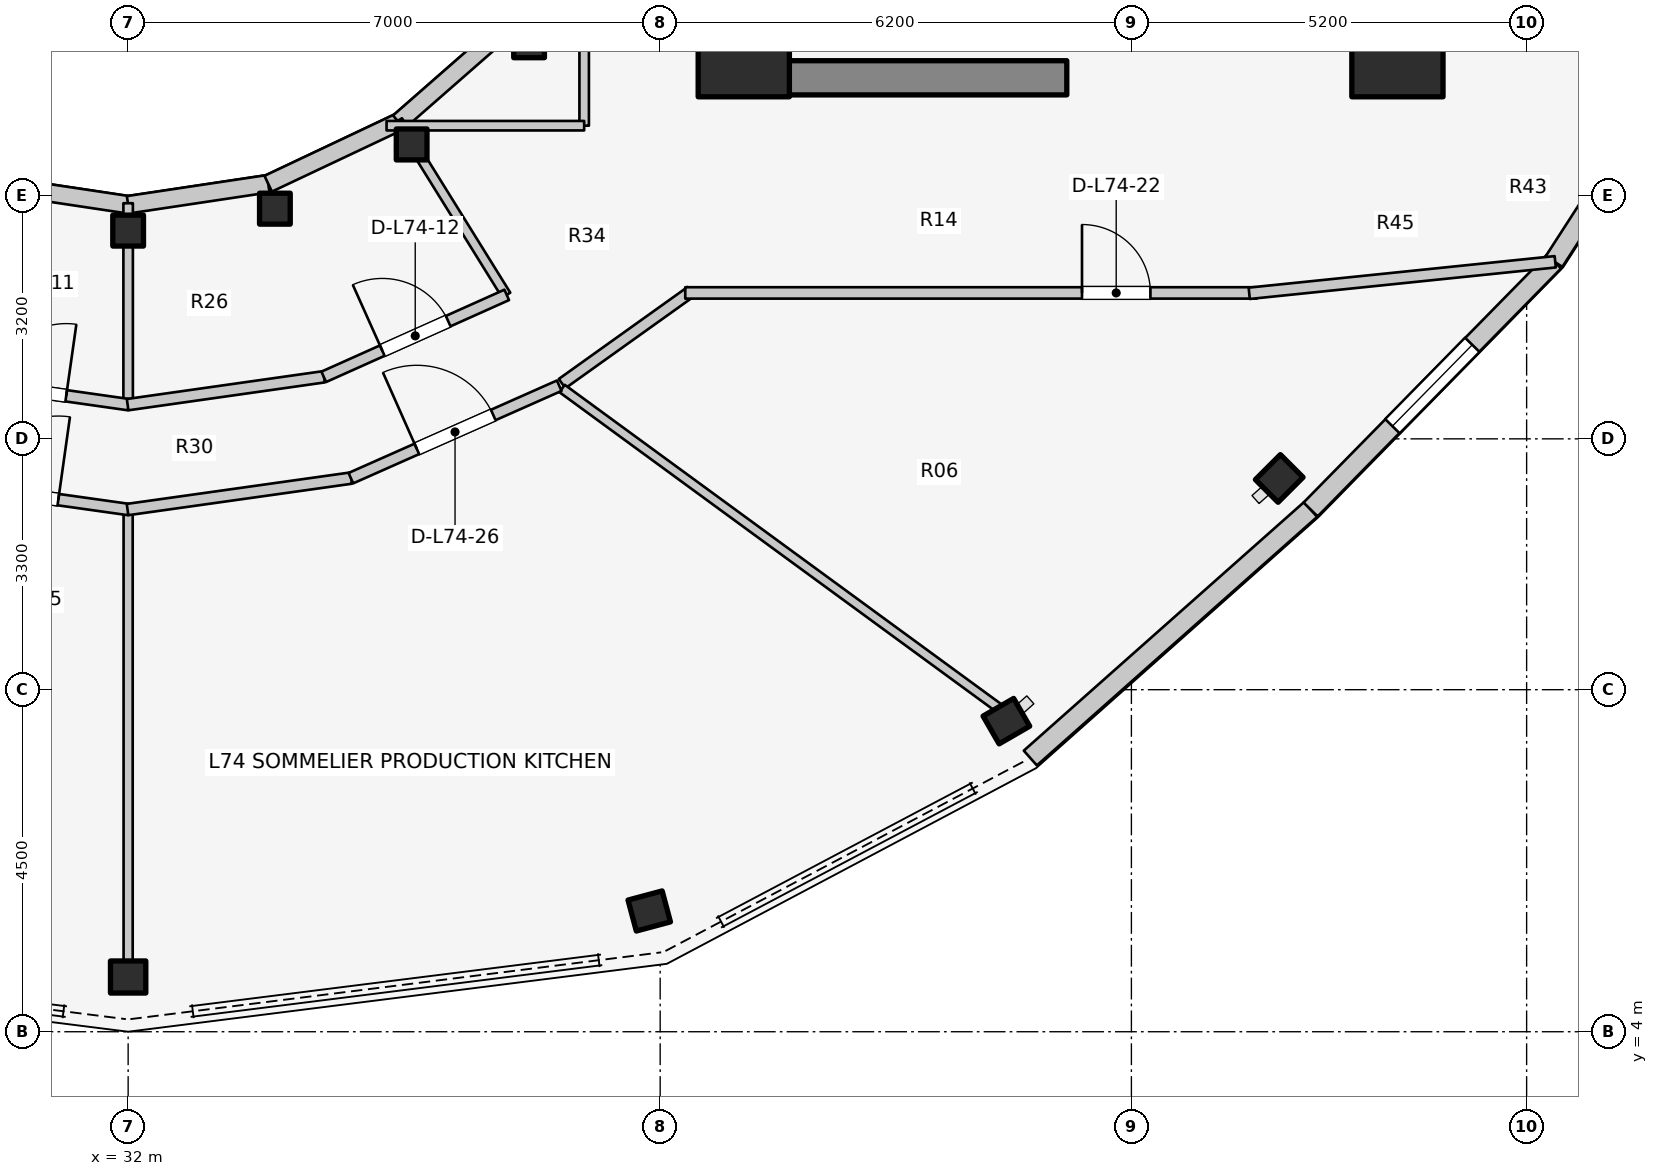
"""IFC4 building model, lengths in metres.
Left out: names, types, materials, properties, quantities, classifications, styles, units other than length and angle.
Written with IfcOpenShell. Run it as: python <this file> out.ifc"""

import sys

from ifc_helpers import new_model, si_unit, direction, frame, frame_2d, origin, origin_2d, place, context, subcontext, project, spatial, rectangle, i_section, extrude, element, fill, save


model = new_model("IFC4")
c1 = context("Model", 3, precision=1e-05, world=origin(), true_north=direction((0.0, 1.0)))
c2 = subcontext(c1, "Body", "Model", "MODEL_VIEW")
j1 = project(units=[si_unit("LENGTHUNIT", "METRE"), si_unit("PLANEANGLEUNIT", "RADIAN")], contexts=[c1])
p1 = place(None, origin())
s1 = spatial("IfcSite", under=j1, at=p1, CompositionType="ELEMENT")
p2 = place(p1, origin())
s2 = spatial("IfcBuilding", under=s1, at=p2, CompositionType="ELEMENT")
p3 = place(p2, frame((0.0, 0.0, 242.4)))
s3 = spatial("IfcBuildingStorey", under=s2, at=p3, CompositionType="ELEMENT", Elevation=242.4)
p4 = place(p3, frame((39.85, 16.55, 0.0), z_axis=(0.0, 0.0, 1.0), x_axis=(1.0, 0.0, 0.0)))
e1 = element("IfcWall", 1, at=p4, inside=s3, PredefinedType="SHEAR", context=c2, shape_type="SweptSolid", body=[
    extrude(rectangle(XDim=4.5, YDim=0.45, at=frame_2d((2.25, 0.0))), origin(), (0.0, 0.0, 1.0), 3.6),
])
for number, where, z_axis, x_axis in (
    (2, (40.1, 16.9, 0.0), (0.0, 0.0, 1.0), (1.0, 0.0, 0.0)),
    (3, (48.7, 16.9, 0.0), (0.0, 0.0, 1.0), (1.0, 0.0, 0.0)),
):
    element("IfcColumn", number, at=place(p3, frame(where, z_axis=z_axis, x_axis=x_axis)), inside=s3, PredefinedType="COLUMN", context=c2, shape_type="SweptSolid", body=[
        extrude(rectangle(XDim=1.2, YDim=1.2, at=origin_2d()), origin(), (0.0, 0.0, 1.0), 3.6),
    ])
p5 = place(p3, frame((32.0, 14.54, 0.0), z_axis=(0.0, 0.0, 1.0), x_axis=(1.0, 0.0, 0.0)))
e4 = element("IfcColumn", 4, at=p5, inside=s3, PredefinedType="COLUMN", context=c2, shape_type="SweptSolid", body=[
    extrude(i_section(OverallWidth=0.404, OverallDepth=0.407, WebThickness=0.027, FlangeThickness=0.044, FilletRadius=0.025, at=origin_2d()), origin(), (0.0, 0.0, 1.0), 3.6),
])
p6 = place(p3, frame((32.0, 4.72, 0.0), z_axis=(0.0, 0.0, 1.0), x_axis=(0.0, -1.0, 0.0)))
e5 = element("IfcColumn", 5, at=p6, inside=s3, PredefinedType="COLUMN", context=c2, shape_type="SweptSolid", body=[
    extrude(i_section(OverallWidth=0.422, OverallDepth=0.465, WebThickness=0.045, FlangeThickness=0.073, FilletRadius=0.025, at=origin_2d()), origin(), (0.0, 0.0, 1.0), 3.6),
])
p7 = place(p3, frame((33.931, 14.828, 0.0), z_axis=(0.0, 0.0, 1.0), x_axis=(1.0, 0.0, 0.0)))
e6 = element("IfcColumn", 6, at=p7, inside=s3, PredefinedType="COLUMN", context=c2, shape_type="SweptSolid", body=[
    extrude(i_section(OverallWidth=0.404, OverallDepth=0.407, WebThickness=0.027, FlangeThickness=0.044, FilletRadius=0.025, at=origin_2d()), origin(), (0.0, 0.0, 1.0), 3.6),
])
p8 = place(p3, frame((38.856, 5.589, 0.0), z_axis=(0.0, 0.0, 1.0), x_axis=(0.258819045103, -0.965925826289, 0.0)))
e7 = element("IfcColumn", 7, at=p8, inside=s3, PredefinedType="COLUMN", context=c2, shape_type="SweptSolid", body=[
    extrude(i_section(OverallWidth=0.422, OverallDepth=0.465, WebThickness=0.045, FlangeThickness=0.073, FilletRadius=0.025, at=origin_2d()), origin(), (0.0, 0.0, 1.0), 3.6),
])
p9 = place(p3, frame((35.73, 15.673, 0.0), z_axis=(0.0, 0.0, 1.0), x_axis=(1.0, 0.0, 0.0)))
e8 = element("IfcColumn", 8, at=p9, inside=s3, PredefinedType="COLUMN", context=c2, shape_type="SweptSolid", body=[
    extrude(i_section(OverallWidth=0.404, OverallDepth=0.407, WebThickness=0.027, FlangeThickness=0.044, FilletRadius=0.025, at=origin_2d()), origin(), (0.0, 0.0, 1.0), 3.6),
])
p10 = place(p3, frame((43.555, 8.086, 0.0), z_axis=(0.0, 0.0, 1.0), x_axis=(0.5, -0.866025403784, 0.0)))
e9 = element("IfcColumn", 9, at=p10, inside=s3, PredefinedType="COLUMN", context=c2, shape_type="SweptSolid", body=[
    extrude(i_section(OverallWidth=0.422, OverallDepth=0.465, WebThickness=0.045, FlangeThickness=0.073, FilletRadius=0.025, at=origin_2d()), origin(), (0.0, 0.0, 1.0), 3.6),
])
p11 = place(p3, frame((37.275, 17.018, 0.0), z_axis=(0.0, 0.0, 1.0), x_axis=(1.0, 0.0, 0.0)))
e10 = element("IfcColumn", 10, at=p11, inside=s3, PredefinedType="COLUMN", context=c2, shape_type="SweptSolid", body=[
    extrude(i_section(OverallWidth=0.404, OverallDepth=0.407, WebThickness=0.027, FlangeThickness=0.044, FilletRadius=0.025, at=origin_2d()), origin(), (0.0, 0.0, 1.0), 3.6),
])
p12 = place(p3, frame((47.145, 11.279, 0.0), z_axis=(0.0, 0.0, 1.0), x_axis=(0.707106781187, -0.707106781187, 0.0)))
e11 = element("IfcColumn", 11, at=p12, inside=s3, PredefinedType="COLUMN", context=c2, shape_type="SweptSolid", body=[
    extrude(i_section(OverallWidth=0.422, OverallDepth=0.465, WebThickness=0.045, FlangeThickness=0.073, FilletRadius=0.025, at=origin_2d()), origin(), (0.0, 0.0, 1.0), 3.6),
])
for number, where, z_axis, x_axis in (
    (12, (30.157, 15.157, 0.0), (0.0, 0.0, 1.0), (0.989, -0.149, 0.0)),
    (13, (32.0, 14.88, 0.0), (0.0, 0.0, 1.0), (0.989, 0.149, 0.0)),
):
    element("IfcWall", number, at=place(p3, frame(where, z_axis=z_axis, x_axis=x_axis)), inside=s3, PredefinedType="STANDARD", context=c2, shape_type="SweptSolid", body=[
        extrude(rectangle(XDim=1.864, YDim=0.23, at=frame_2d((0.932, 0.0))), origin(), (0.0, 0.0, 1.0), 2.6),
    ])
p13 = place(p3, frame((33.843, 15.157, 0.0), z_axis=(0.0, 0.0, 1.0), x_axis=(0.904179699603, 0.427152280606, 0.0)))
e14 = element("IfcWall", 14, at=p13, inside=s3, PredefinedType="STANDARD", context=c2, shape_type="SweptSolid", body=[
    extrude(rectangle(XDim=1.899, YDim=0.23, at=frame_2d((0.95, 0.0))), origin(), (0.0, 0.0, 1.0), 2.6),
])
p14 = place(p3, frame((35.56, 15.968, 0.0), z_axis=(0.0, 0.0, 1.0), x_axis=(0.752576694707, 0.658504607869, 0.0)))
e15 = element("IfcWall", 15, at=p14, inside=s3, PredefinedType="STANDARD", context=c2, shape_type="SweptSolid", body=[
    extrude(rectangle(XDim=1.959, YDim=0.23, at=frame_2d((0.98, 0.0))), origin(), (0.0, 0.0, 1.0), 2.6),
])
p15 = place(p3, frame((43.87, 7.601, 0.0), z_axis=(0.0, 0.0, 1.0), x_axis=(0.748165854006, 0.663511759428, 0.0)))
e16 = element("IfcWall", 16, at=p15, inside=s3, PredefinedType="STANDARD", context=c2, shape_type="SweptSolid", body=[
    extrude(rectangle(XDim=4.929, YDim=0.26, at=frame_2d((2.464, 0.0))), origin(), (0.0, 0.0, 1.0), 3.29),
])
p16 = place(p3, frame((47.558, 10.871, 0.0), z_axis=(0.0, 0.0, 1.0), x_axis=(0.700642973333, 0.713512034881, 0.0)))
e17 = element("IfcWall", 17, at=p16, inside=s3, PredefinedType="STANDARD", context=c2, shape_type="SweptSolid", body=[
    extrude(rectangle(XDim=4.572, YDim=0.26, at=frame_2d((2.286, 0.0))), origin(), (0.0, 0.0, 1.0), 3.29),
])
p17 = place(p16, frame((1.536, 0.0, 0.75)))
e18 = element("IfcOpeningElement", 18, at=p17, cuts=e17, PredefinedType="OPENING", context=c2, shape_type="SweptSolid", body=[
    extrude(rectangle(XDim=1.5, YDim=1.6, at=frame_2d((0.75, 0.8))), frame((0.0, 0.14, 0.0), z_axis=(0.0, -1.0, 0.0), x_axis=(1.0, 0.0, 0.0)), (0.0, 0.0, 1.0), 0.28),
])
p18 = place(p3, frame((50.761, 14.133, 0.0), z_axis=(0.0, 0.0, 1.0), x_axis=(0.542641766008, 0.839964233634, 0.0)))
e19 = element("IfcWall", 19, at=p18, inside=s3, PredefinedType="STANDARD", context=c2, shape_type="SweptSolid", body=[
    extrude(rectangle(XDim=4.319, YDim=0.26, at=frame_2d((2.16, 0.0))), origin(), (0.0, 0.0, 1.0), 3.29),
])
p19 = place(p18, frame((1.41, 0.0, 0.75)))
e20 = element("IfcOpeningElement", 20, at=p19, cuts=e19, PredefinedType="OPENING", context=c2, shape_type="SweptSolid", body=[
    extrude(rectangle(XDim=1.5, YDim=1.6, at=frame_2d((0.75, 0.8))), frame((0.0, 0.14, 0.0), z_axis=(0.0, -1.0, 0.0), x_axis=(1.0, 0.0, 0.0)), (0.0, 0.0, 1.0), 0.28),
])
p20 = place(p3, frame((32.0, 14.9, 0.0), z_axis=(0.0, 0.0, 1.0), x_axis=(0.0, -1.0, 0.0)))
e21 = element("IfcWall", 21, at=p20, inside=s3, PredefinedType="PARTITIONING", context=c2, shape_type="SweptSolid", body=[
    extrude(rectangle(XDim=2.65, YDim=0.125, at=frame_2d((1.325, 0.0))), origin(), (0.0, 0.0, 1.0), 2.672),
])
p21 = place(p3, frame((35.55, 15.985, 0.0), z_axis=(0.0, 0.0, 1.0), x_axis=(0.527527080983, -0.849538215049, 0.0)))
e22 = element("IfcWall", 22, at=p21, inside=s3, PredefinedType="PARTITIONING", context=c2, shape_type="SweptSolid", body=[
    extrude(rectangle(XDim=2.701, YDim=0.125, at=frame_2d((1.351, 0.0))), origin(), (0.0, 0.0, 1.0), 2.672),
])
p22 = place(p3, frame((29.423, 12.617, 0.0), z_axis=(0.0, 0.0, 1.0), x_axis=(0.990078185178, -0.140517569133, 0.0)))
e23 = element("IfcWall", 23, at=p22, inside=s3, PredefinedType="PARTITIONING", context=c2, shape_type="SweptSolid", body=[
    extrude(rectangle(XDim=2.61, YDim=0.15, at=frame_2d((1.305, 0.0))), origin(), (0.0, 0.0, 1.0), 2.816),
])
p23 = place(p22, frame((0.83, 0.0, 0.0)))
e24 = element("IfcOpeningElement", 24, at=p23, cuts=e23, PredefinedType="OPENING", context=c2, shape_type="SweptSolid", body=[
    extrude(rectangle(XDim=0.95, YDim=2.1, at=frame_2d((0.475, 1.05))), frame((0.0, 0.085, 0.0), z_axis=(0.0, -1.0, 0.0), x_axis=(1.0, 0.0, 0.0)), (0.0, 0.0, 1.0), 0.17),
])
p24 = place(p3, frame((31.993, 12.25, 0.0), z_axis=(0.0, 0.0, 1.0), x_axis=(0.990078185178, 0.140517569133, 0.0)))
e25 = element("IfcWall", 25, at=p24, inside=s3, PredefinedType="PARTITIONING", context=c2, shape_type="SweptSolid", body=[
    extrude(rectangle(XDim=2.61, YDim=0.15, at=frame_2d((1.305, 0.0))), origin(), (0.0, 0.0, 1.0), 2.816),
])
p25 = place(p3, frame((34.573, 12.616, 0.0), z_axis=(0.0, 0.0, 1.0), x_axis=(0.912628408652, 0.408790151203, 0.0)))
e26 = element("IfcWall", 26, at=p25, inside=s3, PredefinedType="PARTITIONING", context=c2, shape_type="SweptSolid", body=[
    extrude(rectangle(XDim=2.638, YDim=0.15, at=frame_2d((1.319, 0.0))), origin(), (0.0, 0.0, 1.0), 2.816),
])
p26 = place(p25, frame((0.844, 0.0, 0.0)))
e27 = element("IfcOpeningElement", 27, at=p26, cuts=e26, PredefinedType="OPENING", context=c2, shape_type="SweptSolid", body=[
    extrude(rectangle(XDim=0.95, YDim=2.1, at=frame_2d((0.475, 1.05))), frame((0.0, 0.085, 0.0), z_axis=(0.0, -1.0, 0.0), x_axis=(1.0, 0.0, 0.0)), (0.0, 0.0, 1.0), 0.17),
])
p27 = place(p3, frame((38.0, 15.92, 0.0), z_axis=(0.0, 0.0, 1.0), x_axis=(0.0, 1.0, 0.0)))
e28 = element("IfcWall", 28, at=p27, inside=s3, PredefinedType="PARTITIONING", context=c2, shape_type="SweptSolid", body=[
    extrude(rectangle(XDim=4.28, YDim=0.125, at=frame_2d((2.14, 0.0))), origin(), (0.0, 0.0, 1.0), 2.672),
])
p28 = place(p3, frame((35.4, 15.92, 0.0), z_axis=(0.0, 0.0, 1.0), x_axis=(1.0, 0.0, 0.0)))
e29 = element("IfcWall", 29, at=p28, inside=s3, PredefinedType="PARTITIONING", context=c2, shape_type="SweptSolid", body=[
    extrude(rectangle(XDim=2.6, YDim=0.125, at=frame_2d((1.3, 0.0))), origin(), (0.0, 0.0, 1.0), 2.672),
])
p29 = place(p3, frame((37.71, 12.527, 0.0), z_axis=(0.0, 0.0, 1.0), x_axis=(0.813780999276, 0.581171648669, 0.0)))
e30 = element("IfcWall", 30, at=p29, inside=s3, PredefinedType="PARTITIONING", context=c2, shape_type="SweptSolid", body=[
    extrude(rectangle(XDim=2.082, YDim=0.15, at=frame_2d((1.041, 0.0))), origin(), (0.0, 0.0, 1.0), 2.816),
])
p30 = place(p3, frame((39.33, 13.72, 0.0), z_axis=(0.0, 0.0, 1.0), x_axis=(1.0, 0.0, 0.0)))
e31 = element("IfcWall", 31, at=p30, inside=s3, PredefinedType="PARTITIONING", context=c2, shape_type="SweptSolid", body=[
    extrude(rectangle(XDim=7.52, YDim=0.15, at=frame_2d((3.76, 0.0))), origin(), (0.0, 0.0, 1.0), 2.816),
])
p31 = place(p30, frame((5.22, 0.0, 0.0)))
e32 = element("IfcOpeningElement", 32, at=p31, cuts=e31, PredefinedType="OPENING", context=c2, shape_type="SweptSolid", body=[
    extrude(rectangle(XDim=0.9, YDim=2.1, at=frame_2d((0.45, 1.05))), frame((0.0, 0.085, 0.0), z_axis=(0.0, -1.0, 0.0), x_axis=(1.0, 0.0, 0.0)), (0.0, 0.0, 1.0), 0.17),
])
p32 = place(p3, frame((46.75, 13.715, 0.0), z_axis=(0.0, 0.0, 1.0), x_axis=(0.994734711466, 0.102483431859, 0.0)))
e33 = element("IfcWall", 33, at=p32, inside=s3, PredefinedType="PARTITIONING", context=c2, shape_type="SweptSolid", body=[
    extrude(rectangle(XDim=4.047, YDim=0.15, at=frame_2d((2.024, 0.0))), origin(), (0.0, 0.0, 1.0), 2.66),
])
p33 = place(p3, frame((32.0, 10.815, 0.0), z_axis=(0.0, 0.0, 1.0), x_axis=(0.0, -1.0, 0.0)))
e34 = element("IfcWall", 34, at=p33, inside=s3, PredefinedType="MOVABLE", context=c2, shape_type="SweptSolid", body=[
    extrude(rectangle(XDim=5.895, YDim=0.12, at=frame_2d((2.948, 0.0))), origin(), (0.0, 0.0, 1.0), 2.66),
])
p34 = place(p3, frame((37.709, 12.463, 0.0), z_axis=(0.0, 0.0, 1.0), x_axis=(0.807095694912, -0.590420646027, 0.0)))
e35 = element("IfcWall", 35, at=p34, inside=s3, PredefinedType="MOVABLE", context=c2, shape_type="SweptSolid", body=[
    extrude(rectangle(XDim=7.119, YDim=0.12, at=frame_2d((3.56, 0.0))), origin(), (0.0, 0.0, 1.0), 2.66),
])
p35 = place(p3, frame((29.066, 11.284, 0.0), z_axis=(0.0, 0.0, 1.0), x_axis=(0.990252860391, -0.139281271128, 0.0)))
e36 = element("IfcWall", 36, at=p35, inside=s3, PredefinedType="PARTITIONING", context=c2, shape_type="SweptSolid", body=[
    extrude(rectangle(XDim=2.971, YDim=0.15, at=frame_2d((1.486, 0.0))), origin(), (0.0, 0.0, 1.0), 2.816),
])
p36 = place(p35, frame((0.936, 0.0, 0.0)))
e37 = element("IfcOpeningElement", 37, at=p36, cuts=e36, PredefinedType="OPENING", context=c2, shape_type="SweptSolid", body=[
    extrude(rectangle(XDim=1.1, YDim=2.1, at=frame_2d((0.55, 1.05))), frame((0.0, 0.085, 0.0), z_axis=(0.0, -1.0, 0.0), x_axis=(1.0, 0.0, 0.0)), (0.0, 0.0, 1.0), 0.17),
])
p37 = place(p3, frame((31.992, 10.87, 0.0), z_axis=(0.0, 0.0, 1.0), x_axis=(0.990252860391, 0.139281271128, 0.0)))
e38 = element("IfcWall", 38, at=p37, inside=s3, PredefinedType="PARTITIONING", context=c2, shape_type="SweptSolid", body=[
    extrude(rectangle(XDim=2.971, YDim=0.15, at=frame_2d((1.486, 0.0))), origin(), (0.0, 0.0, 1.0), 2.816),
])
p38 = place(p3, frame((34.93, 11.283, 0.0), z_axis=(0.0, 0.0, 1.0), x_axis=(0.914043013008, 0.4056172708, 0.0)))
e39 = element("IfcWall", 39, at=p38, inside=s3, PredefinedType="PARTITIONING", context=c2, shape_type="SweptSolid", body=[
    extrude(rectangle(XDim=2.999, YDim=0.15, at=frame_2d((1.5, 0.0))), origin(), (0.0, 0.0, 1.0), 2.816),
])
p39 = place(p38, frame((0.949, 0.0, 0.0)))
e40 = element("IfcOpeningElement", 40, at=p39, cuts=e39, PredefinedType="OPENING", context=c2, shape_type="SweptSolid", body=[
    extrude(rectangle(XDim=1.1, YDim=2.1, at=frame_2d((0.55, 1.05))), frame((0.0, 0.085, 0.0), z_axis=(0.0, -1.0, 0.0), x_axis=(1.0, 0.0, 0.0)), (0.0, 0.0, 1.0), 0.17),
])
p40 = place(p17, origin())
e41 = element("IfcWindow", 41, at=p40, inside=s3, PartitioningType="SINGLE_PANEL", PredefinedType="WINDOW", context=c2, shape_type="SweptSolid", body=[
    extrude(rectangle(XDim=1.5, YDim=1.6, at=frame_2d((0.75, 0.8))), frame((0.0, 0.03, 0.0), z_axis=(0.0, -1.0, 0.0), x_axis=(1.0, 0.0, 0.0)), (0.0, 0.0, 1.0), 0.06),
])
fill(e18, e41)
p41 = place(p23, origin())
e42 = element("IfcDoor", 42, at=p41, inside=s3, OperationType="SINGLE_SWING_RIGHT", PredefinedType="DOOR", context=c2, shape_type="SweptSolid", body=[
    extrude(rectangle(XDim=0.95, YDim=2.1, at=frame_2d((0.475, 1.05))), frame((0.0, 0.025, 0.0), z_axis=(0.0, -1.0, 0.0), x_axis=(1.0, 0.0, 0.0)), (0.0, 0.0, 1.0), 0.05),
])
fill(e24, e42)
p42 = place(p26, origin())
e43 = element("IfcDoor", 43, at=p42, inside=s3, OperationType="SINGLE_SWING_LEFT", PredefinedType="DOOR", context=c2, shape_type="SweptSolid", body=[
    extrude(rectangle(XDim=0.95, YDim=2.1, at=frame_2d((0.475, 1.05))), frame((0.0, 0.025, 0.0), z_axis=(0.0, -1.0, 0.0), x_axis=(1.0, 0.0, 0.0)), (0.0, 0.0, 1.0), 0.05),
])
fill(e27, e43)
p43 = place(p31, origin())
e44 = element("IfcDoor", 44, at=p43, inside=s3, OperationType="SINGLE_SWING_LEFT", PredefinedType="DOOR", context=c2, shape_type="SweptSolid", body=[
    extrude(rectangle(XDim=0.9, YDim=2.1, at=frame_2d((0.45, 1.05))), frame((0.0, 0.025, 0.0), z_axis=(0.0, -1.0, 0.0), x_axis=(1.0, 0.0, 0.0)), (0.0, 0.0, 1.0), 0.05),
])
fill(e32, e44)
p44 = place(p36, origin())
e45 = element("IfcDoor", 45, at=p44, inside=s3, OperationType="SINGLE_SWING_RIGHT", PredefinedType="DOOR", context=c2, shape_type="SweptSolid", body=[
    extrude(rectangle(XDim=1.1, YDim=2.1, at=frame_2d((0.55, 1.05))), frame((0.0, 0.025, 0.0), z_axis=(0.0, -1.0, 0.0), x_axis=(1.0, 0.0, 0.0)), (0.0, 0.0, 1.0), 0.05),
])
fill(e37, e45)
p45 = place(p39, origin())
e46 = element("IfcDoor", 46, at=p45, inside=s3, OperationType="SINGLE_SWING_LEFT", PredefinedType="DOOR", context=c2, shape_type="SweptSolid", body=[
    extrude(rectangle(XDim=1.1, YDim=2.1, at=frame_2d((0.55, 1.05))), frame((0.0, 0.025, 0.0), z_axis=(0.0, -1.0, 0.0), x_axis=(1.0, 0.0, 0.0)), (0.0, 0.0, 1.0), 0.05),
])
fill(e40, e46)
save(model, sys.argv[1])
